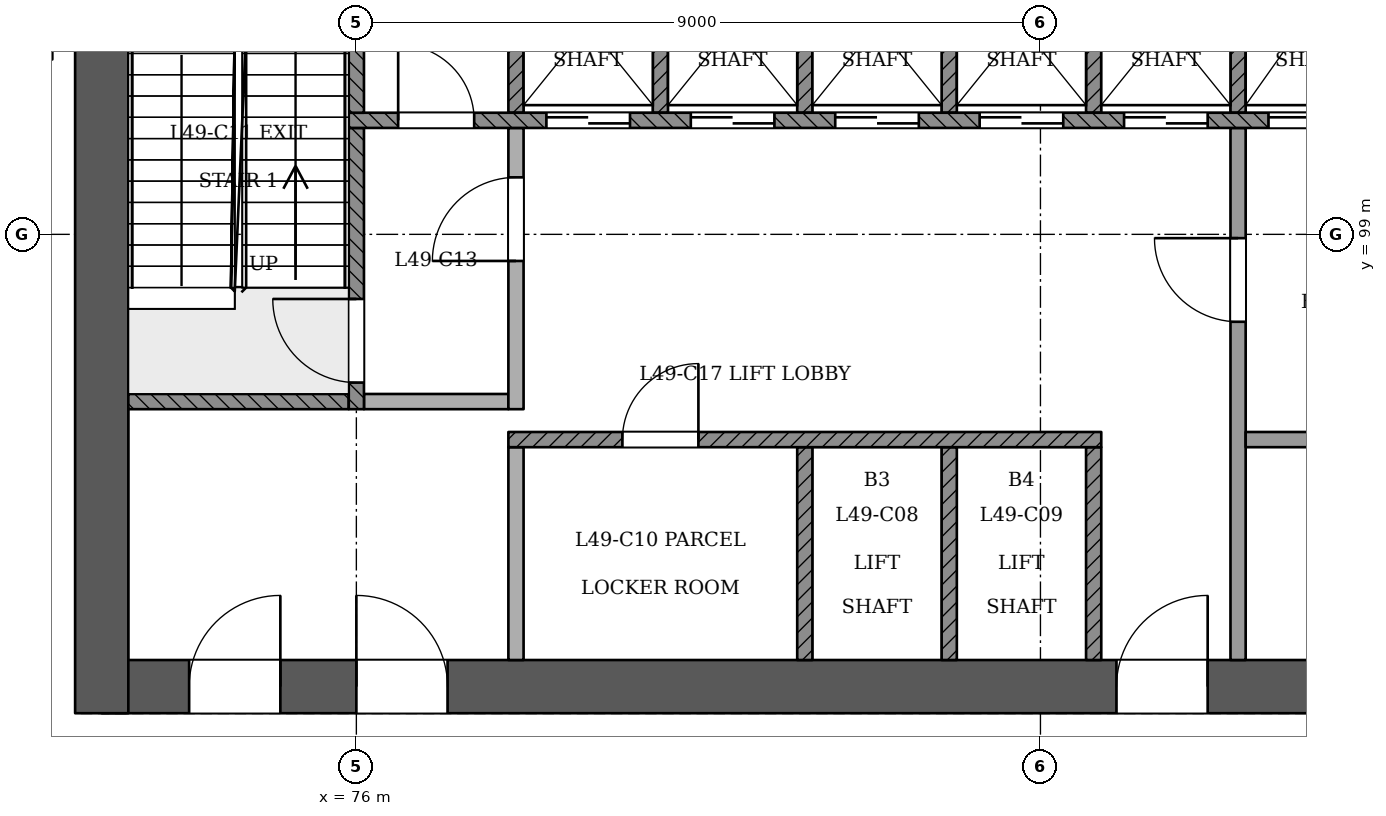
"""IFC4 building model, lengths in metres.
Left out: names, types, materials, properties, quantities, classifications, styles, units other than length and angle.
Written with IfcOpenShell. Run it as: python <this file> out.ifc"""

import sys

from ifc_helpers import new_model, si_unit, direction, frame, frame_2d, origin, place, context, subcontext, project, spatial, rectangle, extrude, element, fill, save


model = new_model("IFC4")
c1 = context("Model", 3, precision=1e-05, world=origin(), true_north=direction((0.0, 1.0)))
c2 = subcontext(c1, "Body", "Model", "MODEL_VIEW")
j1 = project(units=[si_unit("LENGTHUNIT", "METRE"), si_unit("PLANEANGLEUNIT", "RADIAN")], contexts=[c1])
p1 = place(None, origin())
s1 = spatial("IfcSite", under=j1, at=p1, CompositionType="ELEMENT")
p2 = place(p1, origin())
s2 = spatial("IfcBuilding", under=s1, at=p2, CompositionType="ELEMENT")
p3 = place(p2, frame((0.0, 0.0, 189.0)))
s3 = spatial("IfcBuildingStorey", under=s2, at=p3, CompositionType="ELEMENT", Elevation=189.0)
p4 = place(p3, frame((72.65, 93.05, 0.0), z_axis=(0.0, 0.0, 1.0), x_axis=(1.0, 0.0, 0.0)))
e1 = element("IfcWall", 1, at=p4, inside=s3, PredefinedType="SHEAR", context=c2, shape_type="SweptSolid", body=[
    extrude(rectangle(XDim=25.05, YDim=0.7, at=frame_2d((12.525, 0.0))), origin(), (0.0, 0.0, 1.0), 5.4),
])
p5 = place(p4, frame((1.15, 0.0, 0.0)))
e2 = element("IfcOpeningElement", 2, at=p5, cuts=e1, PredefinedType="OPENING", context=c2, shape_type="SweptSolid", body=[
    extrude(rectangle(XDim=1.2, YDim=2.1, at=frame_2d((0.6, 1.05))), frame((0.0, 0.36, 0.0), z_axis=(0.0, -1.0, 0.0), x_axis=(1.0, 0.0, 0.0)), (0.0, 0.0, 1.0), 0.721),
])
p6 = place(p4, frame((3.35, 0.0, 0.0)))
e3 = element("IfcOpeningElement", 3, at=p6, cuts=e1, PredefinedType="OPENING", context=c2, shape_type="SweptSolid", body=[
    extrude(rectangle(XDim=1.2, YDim=2.1, at=frame_2d((0.6, 1.05))), frame((0.0, 0.36, 0.0), z_axis=(0.0, -1.0, 0.0), x_axis=(1.0, 0.0, 0.0)), (0.0, 0.0, 1.0), 0.721),
])
p7 = place(p4, frame((13.35, 0.0, 0.0)))
e4 = element("IfcOpeningElement", 4, at=p7, cuts=e1, PredefinedType="OPENING", context=c2, shape_type="SweptSolid", body=[
    extrude(rectangle(XDim=1.2, YDim=2.1, at=frame_2d((0.6, 1.05))), frame((0.0, 0.36, 0.0), z_axis=(0.0, -1.0, 0.0), x_axis=(1.0, 0.0, 0.0)), (0.0, 0.0, 1.0), 0.721),
])
p8 = place(p4, frame((21.65, 0.0, 0.0)))
e5 = element("IfcOpeningElement", 5, at=p8, cuts=e1, PredefinedType="OPENING", context=c2, shape_type="SweptSolid", body=[
    extrude(rectangle(XDim=1.2, YDim=2.1, at=frame_2d((0.6, 1.05))), frame((0.0, 0.36, 0.0), z_axis=(0.0, -1.0, 0.0), x_axis=(1.0, 0.0, 0.0)), (0.0, 0.0, 1.0), 0.721),
])
p9 = place(p3, frame((72.65, 103.75, 0.0), z_axis=(0.0, 0.0, 1.0), x_axis=(0.0, -1.0, 0.0)))
e6 = element("IfcWall", 6, at=p9, inside=s3, PredefinedType="SHEAR", context=c2, shape_type="SweptSolid", body=[
    extrude(rectangle(XDim=11.05, YDim=0.7, at=frame_2d((5.525, 0.0))), origin(), (0.0, 0.0, 1.0), 5.4),
])
p10 = place(p3, frame((78.1, 93.4, 0.0), z_axis=(0.0, 0.0, 1.0), x_axis=(0.0, 1.0, 0.0)))
e7 = element("IfcWall", 7, at=p10, inside=s3, PredefinedType="PARTITIONING", context=c2, shape_type="SweptSolid", body=[
    extrude(rectangle(XDim=2.8, YDim=0.2, at=frame_2d((1.4, 0.0))), origin(), (0.0, 0.0, 1.0), 4.95),
])
for number, where, z_axis, x_axis in (
    (8, (81.9, 93.4, 0.0), (0.0, 0.0, 1.0), (0.0, 1.0, 0.0)),
    (9, (83.8, 93.4, 0.0), (0.0, 0.0, 1.0), (0.0, 1.0, 0.0)),
    (10, (85.7, 93.4, 0.0), (0.0, 0.0, 1.0), (0.0, 1.0, 0.0)),
):
    element("IfcWall", number, at=place(p3, frame(where, z_axis=z_axis, x_axis=x_axis)), inside=s3, PredefinedType="SOLIDWALL", context=c2, shape_type="SweptSolid", body=[
        extrude(rectangle(XDim=2.8, YDim=0.2, at=frame_2d((1.4, 0.0))), origin(), (0.0, 0.0, 1.0), 4.95),
    ])
p11 = place(p3, frame((87.6, 93.4, 0.0), z_axis=(0.0, 0.0, 1.0), x_axis=(0.0, 1.0, 0.0)))
e11 = element("IfcWall", 11, at=p11, inside=s3, PredefinedType="PARTITIONING", context=c2, shape_type="SweptSolid", body=[
    extrude(rectangle(XDim=7.0, YDim=0.2, at=frame_2d((3.5, 0.0))), origin(), (0.0, 0.0, 1.0), 4.95),
])
p12 = place(p11, frame((4.45, 0.0, 0.0)))
e12 = element("IfcOpeningElement", 12, at=p12, cuts=e11, PredefinedType="OPENING", context=c2, shape_type="SweptSolid", body=[
    extrude(rectangle(XDim=1.1, YDim=2.1, at=frame_2d((0.55, 1.05))), frame((0.0, 0.11, 0.0), z_axis=(0.0, -1.0, 0.0), x_axis=(1.0, 0.0, 0.0)), (0.0, 0.0, 1.0), 0.221),
])
p13 = place(p3, frame((78.0, 96.3, 0.0), z_axis=(0.0, 0.0, 1.0), x_axis=(1.0, 0.0, 0.0)))
e13 = element("IfcWall", 13, at=p13, inside=s3, PredefinedType="SOLIDWALL", context=c2, shape_type="SweptSolid", body=[
    extrude(rectangle(XDim=7.8, YDim=0.2, at=frame_2d((3.9, 0.0))), origin(), (0.0, 0.0, 1.0), 4.95),
])
p14 = place(p13, frame((1.5, 0.0, 0.0)))
e14 = element("IfcOpeningElement", 14, at=p14, cuts=e13, PredefinedType="OPENING", context=c2, shape_type="SweptSolid", body=[
    extrude(rectangle(XDim=1.0, YDim=2.1, at=frame_2d((0.5, 1.05))), frame((0.0, 0.11, 0.0), z_axis=(0.0, -1.0, 0.0), x_axis=(1.0, 0.0, 0.0)), (0.0, 0.0, 1.0), 0.221),
])
p15 = place(p3, frame((87.7, 96.3, 0.0), z_axis=(0.0, 0.0, 1.0), x_axis=(1.0, 0.0, 0.0)))
e15 = element("IfcWall", 15, at=p15, inside=s3, PredefinedType="PARTITIONING", context=c2, shape_type="SweptSolid", body=[
    extrude(rectangle(XDim=3.6, YDim=0.2, at=frame_2d((1.8, 0.0))), origin(), (0.0, 0.0, 1.0), 4.95),
])
p16 = place(p3, frame((73.0, 96.8, 0.0), z_axis=(0.0, 0.0, 1.0), x_axis=(1.0, 0.0, 0.0)))
e16 = element("IfcWall", 16, at=p16, inside=s3, PredefinedType="SOLIDWALL", context=c2, shape_type="SweptSolid", body=[
    extrude(rectangle(XDim=2.9, YDim=0.2, at=frame_2d((1.45, 0.0))), origin(), (0.0, 0.0, 1.0), 4.95),
])
p17 = place(p3, frame((76.0, 96.7, 0.0), z_axis=(0.0, 0.0, 1.0), x_axis=(0.0, 1.0, 0.0)))
e17 = element("IfcWall", 17, at=p17, inside=s3, PredefinedType="SOLIDWALL", context=c2, shape_type="SweptSolid", body=[
    extrude(rectangle(XDim=3.7, YDim=0.2, at=frame_2d((1.85, 0.0))), origin(), (0.0, 0.0, 1.0), 4.95),
])
p18 = place(p17, frame((0.35, 0.0, 0.0)))
e18 = element("IfcOpeningElement", 18, at=p18, cuts=e17, PredefinedType="OPENING", context=c2, shape_type="SweptSolid", body=[
    extrude(rectangle(XDim=1.1, YDim=2.1, at=frame_2d((0.55, 1.05))), frame((0.0, 0.11, 0.0), z_axis=(0.0, -1.0, 0.0), x_axis=(1.0, 0.0, 0.0)), (0.0, 0.0, 1.0), 0.221),
])
p19 = place(p3, frame((76.1, 96.8, 0.0), z_axis=(0.0, 0.0, 1.0), x_axis=(1.0, 0.0, 0.0)))
e19 = element("IfcWall", 19, at=p19, inside=s3, PredefinedType="PARTITIONING", context=c2, shape_type="SweptSolid", body=[
    extrude(rectangle(XDim=1.9, YDim=0.2, at=frame_2d((0.95, 0.0))), origin(), (0.0, 0.0, 1.0), 4.95),
])
p20 = place(p3, frame((78.1, 96.7, 0.0), z_axis=(0.0, 0.0, 1.0), x_axis=(0.0, 1.0, 0.0)))
e20 = element("IfcWall", 20, at=p20, inside=s3, PredefinedType="PARTITIONING", context=c2, shape_type="SweptSolid", body=[
    extrude(rectangle(XDim=3.7, YDim=0.2, at=frame_2d((1.85, 0.0))), origin(), (0.0, 0.0, 1.0), 4.95),
])
p21 = place(p20, frame((1.95, 0.0, 0.0)))
e21 = element("IfcOpeningElement", 21, at=p21, cuts=e20, PredefinedType="OPENING", context=c2, shape_type="SweptSolid", body=[
    extrude(rectangle(XDim=1.1, YDim=2.1, at=frame_2d((0.55, 1.05))), frame((0.0, 0.11, 0.0), z_axis=(0.0, -1.0, 0.0), x_axis=(1.0, 0.0, 0.0)), (0.0, 0.0, 1.0), 0.221),
])
p22 = place(p3, frame((75.9, 100.5, 0.0), z_axis=(0.0, 0.0, 1.0), x_axis=(1.0, 0.0, 0.0)))
e22 = element("IfcWall", 22, at=p22, inside=s3, PredefinedType="SOLIDWALL", context=c2, shape_type="SweptSolid", body=[
    extrude(rectangle(XDim=18.2, YDim=0.2, at=frame_2d((9.1, 0.0))), origin(), (0.0, 0.0, 1.0), 4.95),
])
p23 = place(p22, frame((2.6, 0.0, 0.0)))
e23 = element("IfcOpeningElement", 23, at=p23, cuts=e22, PredefinedType="OPENING", context=c2, shape_type="SweptSolid", body=[
    extrude(rectangle(XDim=1.1, YDim=2.1, at=frame_2d((0.55, 1.05))), frame((0.0, 0.11, 0.0), z_axis=(0.0, -1.0, 0.0), x_axis=(1.0, 0.0, 0.0)), (0.0, 0.0, 1.0), 0.221),
])
p24 = place(p22, frame((4.5, 0.0, 0.0)))
e24 = element("IfcOpeningElement", 24, at=p24, cuts=e22, PredefinedType="OPENING", context=c2, shape_type="SweptSolid", body=[
    extrude(rectangle(XDim=1.1, YDim=2.1, at=frame_2d((0.55, 1.05))), frame((0.0, 0.11, 0.0), z_axis=(0.0, -1.0, 0.0), x_axis=(1.0, 0.0, 0.0)), (0.0, 0.0, 1.0), 0.221),
])
p25 = place(p22, frame((6.4, 0.0, 0.0)))
e25 = element("IfcOpeningElement", 25, at=p25, cuts=e22, PredefinedType="OPENING", context=c2, shape_type="SweptSolid", body=[
    extrude(rectangle(XDim=1.1, YDim=2.1, at=frame_2d((0.55, 1.05))), frame((0.0, 0.11, 0.0), z_axis=(0.0, -1.0, 0.0), x_axis=(1.0, 0.0, 0.0)), (0.0, 0.0, 1.0), 0.221),
])
p26 = place(p22, frame((8.3, 0.0, 0.0)))
e26 = element("IfcOpeningElement", 26, at=p26, cuts=e22, PredefinedType="OPENING", context=c2, shape_type="SweptSolid", body=[
    extrude(rectangle(XDim=1.1, YDim=2.1, at=frame_2d((0.55, 1.05))), frame((0.0, 0.11, 0.0), z_axis=(0.0, -1.0, 0.0), x_axis=(1.0, 0.0, 0.0)), (0.0, 0.0, 1.0), 0.221),
])
p27 = place(p22, frame((10.2, 0.0, 0.0)))
e27 = element("IfcOpeningElement", 27, at=p27, cuts=e22, PredefinedType="OPENING", context=c2, shape_type="SweptSolid", body=[
    extrude(rectangle(XDim=1.1, YDim=2.1, at=frame_2d((0.55, 1.05))), frame((0.0, 0.11, 0.0), z_axis=(0.0, -1.0, 0.0), x_axis=(1.0, 0.0, 0.0)), (0.0, 0.0, 1.0), 0.221),
])
p28 = place(p22, frame((12.1, 0.0, 0.0)))
e28 = element("IfcOpeningElement", 28, at=p28, cuts=e22, PredefinedType="OPENING", context=c2, shape_type="SweptSolid", body=[
    extrude(rectangle(XDim=1.1, YDim=2.1, at=frame_2d((0.55, 1.05))), frame((0.0, 0.11, 0.0), z_axis=(0.0, -1.0, 0.0), x_axis=(1.0, 0.0, 0.0)), (0.0, 0.0, 1.0), 0.221),
])
p29 = place(p22, frame((14.0, 0.0, 0.0)))
e29 = element("IfcOpeningElement", 29, at=p29, cuts=e22, PredefinedType="OPENING", context=c2, shape_type="SweptSolid", body=[
    extrude(rectangle(XDim=1.1, YDim=2.1, at=frame_2d((0.55, 1.05))), frame((0.0, 0.11, 0.0), z_axis=(0.0, -1.0, 0.0), x_axis=(1.0, 0.0, 0.0)), (0.0, 0.0, 1.0), 0.221),
])
p30 = place(p22, frame((0.65, 0.0, 0.0)))
e30 = element("IfcOpeningElement", 30, at=p30, cuts=e22, PredefinedType="OPENING", context=c2, shape_type="SweptSolid", body=[
    extrude(rectangle(XDim=1.0, YDim=2.1, at=frame_2d((0.5, 1.05))), frame((0.0, 0.11, 0.0), z_axis=(0.0, -1.0, 0.0), x_axis=(1.0, 0.0, 0.0)), (0.0, 0.0, 1.0), 0.221),
])
p31 = place(p22, frame((16.3, 0.0, 0.0)))
e31 = element("IfcOpeningElement", 31, at=p31, cuts=e22, PredefinedType="OPENING", context=c2, shape_type="SweptSolid", body=[
    extrude(rectangle(XDim=1.0, YDim=2.1, at=frame_2d((0.5, 1.05))), frame((0.0, 0.11, 0.0), z_axis=(0.0, -1.0, 0.0), x_axis=(1.0, 0.0, 0.0)), (0.0, 0.0, 1.0), 0.221),
])
for number, where, z_axis, x_axis in (
    (32, (76.0, 100.6, 0.0), (0.0, 0.0, 1.0), (0.0, 1.0, 0.0)),
    (33, (78.1, 100.6, 0.0), (0.0, 0.0, 1.0), (0.0, 1.0, 0.0)),
    (34, (80.0, 100.6, 0.0), (0.0, 0.0, 1.0), (0.0, 1.0, 0.0)),
    (35, (81.9, 100.6, 0.0), (0.0, 0.0, 1.0), (0.0, 1.0, 0.0)),
    (36, (83.8, 100.6, 0.0), (0.0, 0.0, 1.0), (0.0, 1.0, 0.0)),
    (37, (85.7, 100.6, 0.0), (0.0, 0.0, 1.0), (0.0, 1.0, 0.0)),
    (38, (87.6, 100.6, 0.0), (0.0, 0.0, 1.0), (0.0, 1.0, 0.0)),
):
    element("IfcWall", number, at=place(p3, frame(where, z_axis=z_axis, x_axis=x_axis)), inside=s3, PredefinedType="SOLIDWALL", context=c2, shape_type="SweptSolid", body=[
        extrude(rectangle(XDim=2.8, YDim=0.2, at=frame_2d((1.4, 0.0))), origin(), (0.0, 0.0, 1.0), 4.95),
    ])
p32 = place(p23, origin())
e39 = element("IfcDoor", 39, at=p32, inside=s3, OperationType="SLIDING_TO_RIGHT", PredefinedType="NOTDEFINED", context=c2, shape_type="SweptSolid", body=[
    extrude(rectangle(XDim=1.1, YDim=2.1, at=frame_2d((0.55, 1.05))), frame((0.0, 0.025, 0.0), z_axis=(0.0, -1.0, 0.0), x_axis=(1.0, 0.0, 0.0)), (0.0, 0.0, 1.0), 0.05),
])
fill(e23, e39)
p33 = place(p24, origin())
e40 = element("IfcDoor", 40, at=p33, inside=s3, OperationType="SLIDING_TO_LEFT", PredefinedType="NOTDEFINED", context=c2, shape_type="SweptSolid", body=[
    extrude(rectangle(XDim=1.1, YDim=2.1, at=frame_2d((0.55, 1.05))), frame((0.0, 0.025, 0.0), z_axis=(0.0, -1.0, 0.0), x_axis=(1.0, 0.0, 0.0)), (0.0, 0.0, 1.0), 0.05),
])
fill(e24, e40)
p34 = place(p25, origin())
e41 = element("IfcDoor", 41, at=p34, inside=s3, OperationType="SLIDING_TO_RIGHT", PredefinedType="NOTDEFINED", context=c2, shape_type="SweptSolid", body=[
    extrude(rectangle(XDim=1.1, YDim=2.1, at=frame_2d((0.55, 1.05))), frame((0.0, 0.025, 0.0), z_axis=(0.0, -1.0, 0.0), x_axis=(1.0, 0.0, 0.0)), (0.0, 0.0, 1.0), 0.05),
])
fill(e25, e41)
p35 = place(p26, origin())
e42 = element("IfcDoor", 42, at=p35, inside=s3, OperationType="SLIDING_TO_LEFT", PredefinedType="NOTDEFINED", context=c2, shape_type="SweptSolid", body=[
    extrude(rectangle(XDim=1.1, YDim=2.1, at=frame_2d((0.55, 1.05))), frame((0.0, 0.025, 0.0), z_axis=(0.0, -1.0, 0.0), x_axis=(1.0, 0.0, 0.0)), (0.0, 0.0, 1.0), 0.05),
])
fill(e26, e42)
p36 = place(p27, origin())
e43 = element("IfcDoor", 43, at=p36, inside=s3, OperationType="SLIDING_TO_RIGHT", PredefinedType="NOTDEFINED", context=c2, shape_type="SweptSolid", body=[
    extrude(rectangle(XDim=1.1, YDim=2.1, at=frame_2d((0.55, 1.05))), frame((0.0, 0.025, 0.0), z_axis=(0.0, -1.0, 0.0), x_axis=(1.0, 0.0, 0.0)), (0.0, 0.0, 1.0), 0.05),
])
fill(e27, e43)
p37 = place(p28, origin())
e44 = element("IfcDoor", 44, at=p37, inside=s3, OperationType="SLIDING_TO_RIGHT", PredefinedType="NOTDEFINED", context=c2, shape_type="SweptSolid", body=[
    extrude(rectangle(XDim=1.1, YDim=2.1, at=frame_2d((0.55, 1.05))), frame((0.0, 0.025, 0.0), z_axis=(0.0, -1.0, 0.0), x_axis=(1.0, 0.0, 0.0)), (0.0, 0.0, 1.0), 0.05),
])
fill(e28, e44)
p38 = place(p18, origin())
e45 = element("IfcDoor", 45, at=p38, inside=s3, OperationType="SINGLE_SWING_RIGHT", PredefinedType="NOTDEFINED", context=c2, shape_type="SweptSolid", body=[
    extrude(rectangle(XDim=1.1, YDim=2.1, at=frame_2d((0.55, 1.05))), frame((0.0, 0.025, 0.0), z_axis=(0.0, -1.0, 0.0), x_axis=(1.0, 0.0, 0.0)), (0.0, 0.0, 1.0), 0.05),
])
fill(e18, e45)
p39 = place(p21, origin())
e46 = element("IfcDoor", 46, at=p39, inside=s3, OperationType="SINGLE_SWING_LEFT", PredefinedType="NOTDEFINED", context=c2, shape_type="SweptSolid", body=[
    extrude(rectangle(XDim=1.1, YDim=2.1, at=frame_2d((0.55, 1.05))), frame((0.0, 0.025, 0.0), z_axis=(0.0, -1.0, 0.0), x_axis=(1.0, 0.0, 0.0)), (0.0, 0.0, 1.0), 0.05),
])
fill(e21, e46)
p40 = place(p12, origin())
e47 = element("IfcDoor", 47, at=p40, inside=s3, OperationType="SINGLE_SWING_RIGHT", PredefinedType="NOTDEFINED", context=c2, shape_type="SweptSolid", body=[
    extrude(rectangle(XDim=1.1, YDim=2.1, at=frame_2d((0.55, 1.05))), frame((0.0, 0.025, 0.0), z_axis=(0.0, -1.0, 0.0), x_axis=(1.0, 0.0, 0.0)), (0.0, 0.0, 1.0), 0.05),
])
fill(e12, e47)
p41 = place(p5, origin())
e48 = element("IfcDoor", 48, at=p41, inside=s3, OperationType="SINGLE_SWING_RIGHT", PredefinedType="NOTDEFINED", context=c2, shape_type="SweptSolid", body=[
    extrude(rectangle(XDim=1.2, YDim=2.1, at=frame_2d((0.6, 1.05))), frame((0.0, 0.025, 0.0), z_axis=(0.0, -1.0, 0.0), x_axis=(1.0, 0.0, 0.0)), (0.0, 0.0, 1.0), 0.05),
])
fill(e2, e48)
p42 = place(p6, origin())
e49 = element("IfcDoor", 49, at=p42, inside=s3, OperationType="SINGLE_SWING_LEFT", PredefinedType="NOTDEFINED", context=c2, shape_type="SweptSolid", body=[
    extrude(rectangle(XDim=1.2, YDim=2.1, at=frame_2d((0.6, 1.05))), frame((0.0, 0.025, 0.0), z_axis=(0.0, -1.0, 0.0), x_axis=(1.0, 0.0, 0.0)), (0.0, 0.0, 1.0), 0.05),
])
fill(e3, e49)
p43 = place(p7, origin())
e50 = element("IfcDoor", 50, at=p43, inside=s3, OperationType="SINGLE_SWING_RIGHT", PredefinedType="NOTDEFINED", context=c2, shape_type="SweptSolid", body=[
    extrude(rectangle(XDim=1.2, YDim=2.1, at=frame_2d((0.6, 1.05))), frame((0.0, 0.025, 0.0), z_axis=(0.0, -1.0, 0.0), x_axis=(1.0, 0.0, 0.0)), (0.0, 0.0, 1.0), 0.05),
])
fill(e4, e50)
p44 = place(p30, origin())
e51 = element("IfcDoor", 51, at=p44, inside=s3, OperationType="SINGLE_SWING_LEFT", PredefinedType="NOTDEFINED", context=c2, shape_type="SweptSolid", body=[
    extrude(rectangle(XDim=1.0, YDim=2.1, at=frame_2d((0.5, 1.05))), frame((0.0, 0.025, 0.0), z_axis=(0.0, -1.0, 0.0), x_axis=(1.0, 0.0, 0.0)), (0.0, 0.0, 1.0), 0.05),
])
fill(e30, e51)
p45 = place(p14, origin())
e52 = element("IfcDoor", 52, at=p45, inside=s3, OperationType="SINGLE_SWING_RIGHT", PredefinedType="NOTDEFINED", context=c2, shape_type="SweptSolid", body=[
    extrude(rectangle(XDim=1.0, YDim=2.1, at=frame_2d((0.5, 1.05))), frame((0.0, 0.025, 0.0), z_axis=(0.0, -1.0, 0.0), x_axis=(1.0, 0.0, 0.0)), (0.0, 0.0, 1.0), 0.05),
])
fill(e14, e52)
save(model, sys.argv[1])
